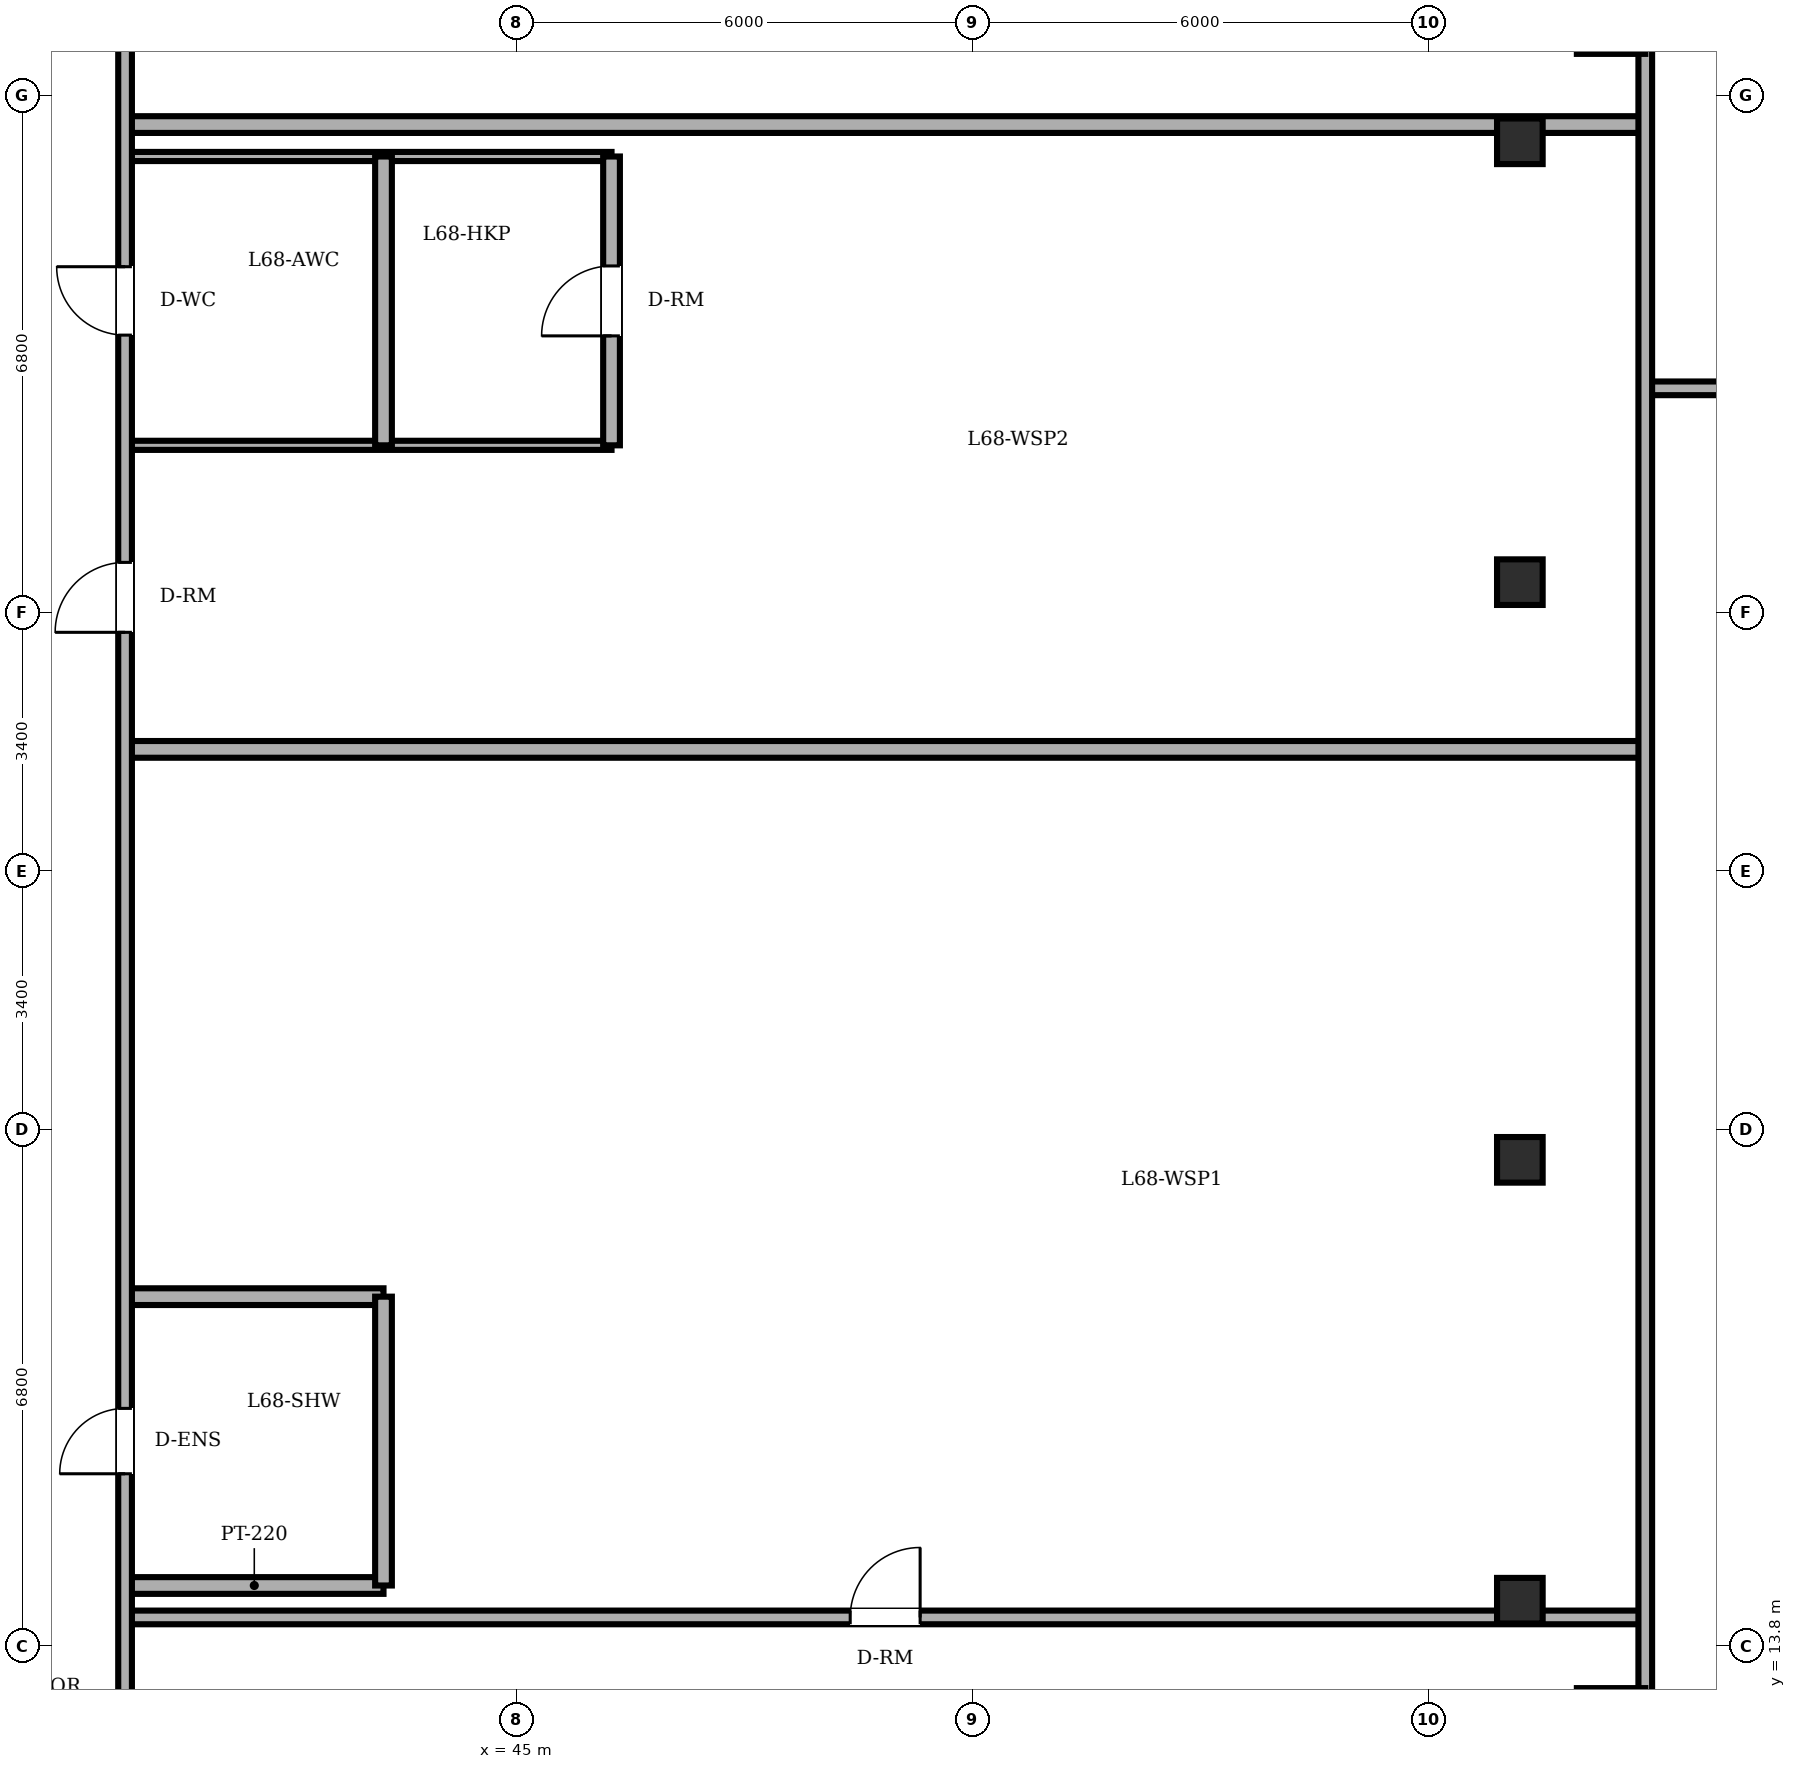
"""IFC4 building model, lengths in metres.
Left out: names, types, materials, properties, quantities, classifications, styles, units other than length and angle.
Written with IfcOpenShell. Run it as: python <this file> out.ifc"""

import sys

from ifc_helpers import new_model, si_unit, direction, frame, frame_2d, origin, origin_2d, place, context, subcontext, project, spatial, rectangle, circle, extrude, element, fill, save


model = new_model("IFC4")
c1 = context("Model", 3, precision=1e-05, world=origin(), true_north=direction((0.0, 1.0)))
c2 = subcontext(c1, "Body", "Model", "MODEL_VIEW")
j1 = project(units=[si_unit("LENGTHUNIT", "METRE"), si_unit("PLANEANGLEUNIT", "RADIAN")], contexts=[c1])
p1 = place(None, origin())
s1 = spatial("IfcSite", under=j1, at=p1, CompositionType="ELEMENT")
p2 = place(p1, origin())
s2 = spatial("IfcBuilding", under=s1, at=p2, CompositionType="ELEMENT")
p3 = place(p2, frame((0.0, 0.0, 262.45)))
s3 = spatial("IfcBuildingStorey", under=s2, at=p3, CompositionType="ELEMENT", Elevation=262.45)
for number, where, z_axis, x_axis in (
    (1, (59.4, 12.8, 0.0), (0.0, 0.0, 1.0), (1.0, 0.0, 0.0)),
    (2, (59.4, 35.2, 0.0), (0.0, 0.0, 1.0), (1.0, 0.0, 0.0)),
):
    element("IfcColumn", number, at=place(p3, frame(where, z_axis=z_axis, x_axis=x_axis)), inside=s3, PredefinedType="COLUMN", context=c2, shape_type="SweptSolid", body=[
        extrude(circle(Radius=0.45, at=origin_2d()), origin(), (0.0, 0.0, 1.0), 3.65),
    ])
for number, where, z_axis, x_axis in (
    (3, (58.2, 14.4, 0.0), (0.0, 0.0, 1.0), (1.0, 0.0, 0.0)),
    (4, (58.2, 20.2, 0.0), (0.0, 0.0, 1.0), (1.0, 0.0, 0.0)),
    (5, (58.2, 27.8, 0.0), (0.0, 0.0, 1.0), (1.0, 0.0, 0.0)),
    (6, (58.2, 33.6, 0.0), (0.0, 0.0, 1.0), (1.0, 0.0, 0.0)),
):
    element("IfcColumn", number, at=place(p3, frame(where, z_axis=z_axis, x_axis=x_axis)), inside=s3, PredefinedType="COLUMN", context=c2, shape_type="SweptSolid", body=[
        extrude(rectangle(XDim=0.6, YDim=0.6, at=origin_2d()), origin(), (0.0, 0.0, 1.0), 3.65),
    ])
p4 = place(p3, frame((39.85, 14.18, 0.0), z_axis=(0.0, 0.0, 1.0), x_axis=(1.0, 0.0, 0.0)))
e7 = element("IfcWall", 7, at=p4, inside=s3, PredefinedType="PARTITIONING", context=c2, shape_type="SweptSolid", body=[
    extrude(rectangle(XDim=20.0, YDim=0.18, at=frame_2d((10.0, 0.0))), origin(), (0.0, 0.0, 1.0), 3.092),
])
p5 = place(p4, frame((9.54, 0.0, 0.0)))
e8 = element("IfcOpeningElement", 8, at=p5, cuts=e7, PredefinedType="OPENING", context=c2, shape_type="SweptSolid", body=[
    extrude(rectangle(XDim=0.92, YDim=2.1, at=frame_2d((0.46, 1.05))), frame((0.0, 0.1, 0.0), z_axis=(0.0, -1.0, 0.0), x_axis=(1.0, 0.0, 0.0)), (0.0, 0.0, 1.0), 0.2),
])
p6 = place(p3, frame((39.85, 14.6, 0.0), z_axis=(0.0, 0.0, 1.0), x_axis=(1.0, 0.0, 0.0)))
e9 = element("IfcWall", 9, at=p6, inside=s3, PredefinedType="PARTITIONING", context=c2, shape_type="SweptSolid", body=[
    extrude(rectangle(XDim=3.4, YDim=0.22, at=frame_2d((1.7, 0.0))), origin(), (0.0, 0.0, 1.0), 3.092),
])
p7 = place(p3, frame((39.85, 18.4, 0.0), z_axis=(0.0, 0.0, 1.0), x_axis=(1.0, 0.0, 0.0)))
e10 = element("IfcWall", 10, at=p7, inside=s3, PredefinedType="PARTITIONING", context=c2, shape_type="SweptSolid", body=[
    extrude(rectangle(XDim=3.4, YDim=0.22, at=frame_2d((1.7, 0.0))), origin(), (0.0, 0.0, 1.0), 3.072),
])
p8 = place(p3, frame((39.85, 25.6, 0.0), z_axis=(0.0, 0.0, 1.0), x_axis=(1.0, 0.0, 0.0)))
e11 = element("IfcWall", 11, at=p8, inside=s3, PredefinedType="PARTITIONING", context=c2, shape_type="SweptSolid", body=[
    extrude(rectangle(XDim=20.0, YDim=0.22, at=frame_2d((10.0, 0.0))), origin(), (0.0, 0.0, 1.0), 3.45),
])
p9 = place(p3, frame((39.85, 29.6, 0.0), z_axis=(0.0, 0.0, 1.0), x_axis=(1.0, 0.0, 0.0)))
e12 = element("IfcWall", 12, at=p9, inside=s3, PredefinedType="PARTITIONING", context=c2, shape_type="SweptSolid", body=[
    extrude(rectangle(XDim=6.4, YDim=0.12, at=frame_2d((3.2, 0.0))), origin(), (0.0, 0.0, 1.0), 3.072),
])
p10 = place(p3, frame((59.85, 30.35, 0.0), z_axis=(0.0, 0.0, 1.0), x_axis=(1.0, 0.0, 0.0)))
e13 = element("IfcWall", 13, at=p10, inside=s3, PredefinedType="PARTITIONING", context=c2, shape_type="SweptSolid", body=[
    extrude(rectangle(XDim=15.139, YDim=0.18, at=frame_2d((7.569, 0.0))), origin(), (0.0, 0.0, 1.0), 3.45),
])
p11 = place(p10, frame((0.975, 0.0, 0.0)))
e14 = element("IfcOpeningElement", 14, at=p11, cuts=e13, PredefinedType="OPENING", context=c2, shape_type="SweptSolid", body=[
    extrude(rectangle(XDim=0.92, YDim=2.1, at=frame_2d((0.46, 1.05))), frame((0.0, 0.1, 0.0), z_axis=(0.0, -1.0, 0.0), x_axis=(1.0, 0.0, 0.0)), (0.0, 0.0, 1.0), 0.2),
])
p12 = place(p3, frame((39.85, 33.4, 0.0), z_axis=(0.0, 0.0, 1.0), x_axis=(1.0, 0.0, 0.0)))
e15 = element("IfcWall", 15, at=p12, inside=s3, PredefinedType="PARTITIONING", context=c2, shape_type="SweptSolid", body=[
    extrude(rectangle(XDim=6.4, YDim=0.12, at=frame_2d((3.2, 0.0))), origin(), (0.0, 0.0, 1.0), 3.092),
])
p13 = place(p3, frame((39.85, 33.82, 0.0), z_axis=(0.0, 0.0, 1.0), x_axis=(1.0, 0.0, 0.0)))
e16 = element("IfcWall", 16, at=p13, inside=s3, PredefinedType="PARTITIONING", context=c2, shape_type="SweptSolid", body=[
    extrude(rectangle(XDim=20.0, YDim=0.22, at=frame_2d((10.0, 0.0))), origin(), (0.0, 0.0, 1.0), 3.092),
])
p14 = place(p3, frame((39.85, 10.8, 0.0), z_axis=(0.0, 0.0, 1.0), x_axis=(0.0, 1.0, 0.0)))
e17 = element("IfcWall", 17, at=p14, inside=s3, PredefinedType="PARTITIONING", context=c2, shape_type="SweptSolid", body=[
    extrude(rectangle(XDim=26.4, YDim=0.18, at=frame_2d((13.2, 0.0))), origin(), (0.0, 0.0, 1.0), 3.45),
])
p15 = place(p14, frame((20.25, 0.0, 0.0)))
e18 = element("IfcOpeningElement", 18, at=p15, cuts=e17, PredefinedType="OPENING", context=c2, shape_type="SweptSolid", body=[
    extrude(rectangle(XDim=0.9, YDim=2.1, at=frame_2d((0.45, 1.05))), frame((0.0, 0.1, 0.0), z_axis=(0.0, -1.0, 0.0), x_axis=(1.0, 0.0, 0.0)), (0.0, 0.0, 1.0), 0.2),
])
p16 = place(p14, frame((5.27, 0.0, 0.0)))
e19 = element("IfcOpeningElement", 19, at=p16, cuts=e17, PredefinedType="OPENING", context=c2, shape_type="SweptSolid", body=[
    extrude(rectangle(XDim=0.86, YDim=2.1, at=frame_2d((0.43, 1.05))), frame((0.0, 0.1, 0.0), z_axis=(0.0, -1.0, 0.0), x_axis=(1.0, 0.0, 0.0)), (0.0, 0.0, 1.0), 0.2),
])
p17 = place(p14, frame((16.34, 0.0, 0.0)))
e20 = element("IfcOpeningElement", 20, at=p17, cuts=e17, PredefinedType="OPENING", context=c2, shape_type="SweptSolid", body=[
    extrude(rectangle(XDim=0.92, YDim=2.1, at=frame_2d((0.46, 1.05))), frame((0.0, 0.1, 0.0), z_axis=(0.0, -1.0, 0.0), x_axis=(1.0, 0.0, 0.0)), (0.0, 0.0, 1.0), 0.2),
])
for number, where, z_axis, x_axis in (
    (21, (43.25, 14.6, 0.0), (0.0, 0.0, 1.0), (0.0, 1.0, 0.0)),
    (22, (43.25, 29.6, 0.0), (0.0, 0.0, 1.0), (0.0, 1.0, 0.0)),
):
    element("IfcWall", number, at=place(p3, frame(where, z_axis=z_axis, x_axis=x_axis)), inside=s3, PredefinedType="PARTITIONING", context=c2, shape_type="SweptSolid", body=[
        extrude(rectangle(XDim=3.8, YDim=0.22, at=frame_2d((1.9, 0.0))), origin(), (0.0, 0.0, 1.0), 3.45),
    ])
p18 = place(p3, frame((46.25, 29.6, 0.0), z_axis=(0.0, 0.0, 1.0), x_axis=(0.0, 1.0, 0.0)))
e23 = element("IfcWall", 23, at=p18, inside=s3, PredefinedType="PARTITIONING", context=c2, shape_type="SweptSolid", body=[
    extrude(rectangle(XDim=3.8, YDim=0.22, at=frame_2d((1.9, 0.0))), origin(), (0.0, 0.0, 1.0), 3.45),
])
p19 = place(p18, frame((1.44, 0.0, 0.0)))
e24 = element("IfcOpeningElement", 24, at=p19, cuts=e23, PredefinedType="OPENING", context=c2, shape_type="SweptSolid", body=[
    extrude(rectangle(XDim=0.92, YDim=2.1, at=frame_2d((0.46, 1.05))), frame((0.0, 0.12, 0.0), z_axis=(0.0, -1.0, 0.0), x_axis=(1.0, 0.0, 0.0)), (0.0, 0.0, 1.0), 0.24),
])
p20 = place(p3, frame((59.85, 10.8, 0.0), z_axis=(0.0, 0.0, 1.0), x_axis=(0.0, 1.0, 0.0)))
e25 = element("IfcWall", 25, at=p20, inside=s3, PredefinedType="PARTITIONING", context=c2, shape_type="SweptSolid", body=[
    extrude(rectangle(XDim=26.4, YDim=0.18, at=frame_2d((13.2, 0.0))), origin(), (0.0, 0.0, 1.0), 3.45),
])
p21 = place(p15, origin())
e26 = element("IfcDoor", 26, at=p21, inside=s3, OperationType="SINGLE_SWING_RIGHT", PredefinedType="DOOR", context=c2, shape_type="SweptSolid", body=[
    extrude(rectangle(XDim=0.9, YDim=2.1, at=frame_2d((0.45, 1.05))), frame((0.0, 0.025, 0.0), z_axis=(0.0, -1.0, 0.0), x_axis=(1.0, 0.0, 0.0)), (0.0, 0.0, 1.0), 0.05),
])
fill(e18, e26)
p22 = place(p16, origin())
e27 = element("IfcDoor", 27, at=p22, inside=s3, OperationType="SINGLE_SWING_LEFT", PredefinedType="DOOR", context=c2, shape_type="SweptSolid", body=[
    extrude(rectangle(XDim=0.86, YDim=2.1, at=frame_2d((0.43, 1.05))), frame((0.0, 0.025, 0.0), z_axis=(0.0, -1.0, 0.0), x_axis=(1.0, 0.0, 0.0)), (0.0, 0.0, 1.0), 0.05),
])
fill(e19, e27)
p23 = place(p5, origin())
e28 = element("IfcDoor", 28, at=p23, inside=s3, OperationType="SINGLE_SWING_RIGHT", PredefinedType="DOOR", context=c2, shape_type="SweptSolid", body=[
    extrude(rectangle(XDim=0.92, YDim=2.1, at=frame_2d((0.46, 1.05))), frame((0.0, 0.025, 0.0), z_axis=(0.0, -1.0, 0.0), x_axis=(1.0, 0.0, 0.0)), (0.0, 0.0, 1.0), 0.05),
])
fill(e8, e28)
p24 = place(p17, origin())
e29 = element("IfcDoor", 29, at=p24, inside=s3, OperationType="SINGLE_SWING_LEFT", PredefinedType="DOOR", context=c2, shape_type="SweptSolid", body=[
    extrude(rectangle(XDim=0.92, YDim=2.1, at=frame_2d((0.46, 1.05))), frame((0.0, 0.025, 0.0), z_axis=(0.0, -1.0, 0.0), x_axis=(1.0, 0.0, 0.0)), (0.0, 0.0, 1.0), 0.05),
])
fill(e20, e29)
p25 = place(p19, origin())
e30 = element("IfcDoor", 30, at=p25, inside=s3, OperationType="SINGLE_SWING_LEFT", PredefinedType="DOOR", context=c2, shape_type="SweptSolid", body=[
    extrude(rectangle(XDim=0.92, YDim=2.1, at=frame_2d((0.46, 1.05))), frame((0.0, 0.025, 0.0), z_axis=(0.0, -1.0, 0.0), x_axis=(1.0, 0.0, 0.0)), (0.0, 0.0, 1.0), 0.05),
])
fill(e24, e30)
save(model, sys.argv[1])
